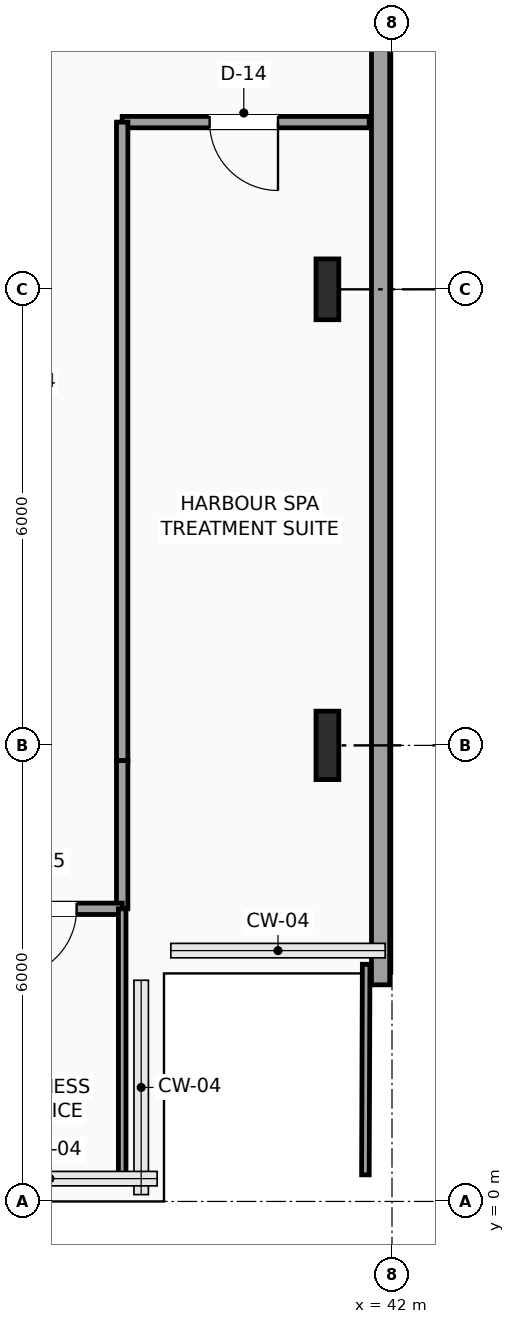
"""IFC4 building model, lengths in metres.
Left out: names, types, materials, properties, quantities, classifications, styles, units other than length and angle.
Written with IfcOpenShell. Run it as: python <this file> out.ifc"""

import sys

from ifc_helpers import new_model, si_unit, direction, frame, frame_2d, origin, origin_2d, place, context, subcontext, project, spatial, rectangle, i_section, extrude, element, fill, save


model = new_model("IFC4")
c1 = context("Model", 3, precision=1e-05, world=origin(), true_north=direction((0.0, 1.0)))
c2 = subcontext(c1, "Body", "Model", "MODEL_VIEW")
j1 = project(units=[si_unit("LENGTHUNIT", "METRE"), si_unit("PLANEANGLEUNIT", "RADIAN")], contexts=[c1])
p1 = place(None, origin())
s1 = spatial("IfcSite", under=j1, at=p1, CompositionType="ELEMENT")
p2 = place(p1, origin())
s2 = spatial("IfcBuilding", under=s1, at=p2, CompositionType="ELEMENT")
p3 = place(p2, frame((0.0, 0.0, 195.45)))
s3 = spatial("IfcBuildingStorey", under=s2, at=p3, CompositionType="ELEMENT", Elevation=195.45)
p4 = place(p3, frame((41.15, 6.0, 0.0), z_axis=(0.0, 0.0, 1.0), x_axis=(1.0, 0.0, 0.0)))
e1 = element("IfcColumn", 1, at=p4, inside=s3, PredefinedType="COLUMN", context=c2, shape_type="SweptSolid", body=[
    extrude(i_section(OverallWidth=0.3, OverallDepth=0.9, WebThickness=0.019, FlangeThickness=0.035, FilletRadius=0.03, at=origin_2d()), origin(), (0.0, 0.0, 1.0), 3.75),
])
p5 = place(p3, frame((41.15, 12.0, 0.0), z_axis=(0.0, 0.0, 1.0), x_axis=(1.0, 0.0, 0.0)))
e2 = element("IfcColumn", 2, at=p5, inside=s3, PredefinedType="COLUMN", context=c2, shape_type="SweptSolid", body=[
    extrude(i_section(OverallWidth=0.3, OverallDepth=0.8, WebThickness=0.018, FlangeThickness=0.033, FilletRadius=0.03, at=origin_2d()), origin(), (0.0, 0.0, 1.0), 3.75),
])
p6 = place(p3, frame((41.85, 21.15, 0.0), z_axis=(0.0, 0.0, 1.0), x_axis=(0.0, -1.0, 0.0)))
e3 = element("IfcWall", 3, at=p6, inside=s3, PredefinedType="SOLIDWALL", context=c2, shape_type="SweptSolid", body=[
    extrude(rectangle(XDim=18.3, YDim=0.24, at=frame_2d((9.15, 0.0))), origin(), (0.0, 0.0, 1.0), 3.475),
])
p7 = place(p3, frame((41.7, 14.2, 0.0), z_axis=(0.0, 0.0, 1.0), x_axis=(-1.0, 0.0, 0.0)))
e4 = element("IfcWall", 4, at=p7, inside=s3, PredefinedType="PARTITIONING", context=c2, shape_type="SweptSolid", body=[
    extrude(rectangle(XDim=3.25, YDim=0.15, at=frame_2d((1.625, 0.0))), origin(), (0.0, 0.0, 1.0), 3.475),
])
p8 = place(p7, frame((1.2, 0.0, 0.0)))
e5 = element("IfcOpeningElement", 5, at=p8, cuts=e4, PredefinedType="OPENING", context=c2, shape_type="SweptSolid", body=[
    extrude(rectangle(XDim=0.9, YDim=2.1, at=frame_2d((0.45, 1.05))), frame((0.0, 0.085, 0.0), z_axis=(0.0, -1.0, 0.0), x_axis=(1.0, 0.0, 0.0)), (0.0, 0.0, 1.0), 0.17),
])
p9 = place(p3, frame((38.45, 14.2, 0.0), z_axis=(0.0, 0.0, 1.0), x_axis=(0.0, -1.0, 0.0)))
e6 = element("IfcWall", 6, at=p9, inside=s3, PredefinedType="PARTITIONING", context=c2, shape_type="SweptSolid", body=[
    extrude(rectangle(XDim=8.4, YDim=0.15, at=frame_2d((4.2, 0.0))), origin(), (0.0, 0.0, 1.0), 3.475),
])
p10 = place(p3, frame((38.45, 5.8, 0.0), z_axis=(0.0, 0.0, 1.0), x_axis=(0.0, -1.0, 0.0)))
e7 = element("IfcWall", 7, at=p10, inside=s3, PredefinedType="PARTITIONING", context=c2, shape_type="SweptSolid", body=[
    extrude(rectangle(XDim=1.95, YDim=0.15, at=frame_2d((0.975, 0.0))), origin(), (0.0, 0.0, 1.0), 3.475),
])
p11 = place(p3, frame((38.45, 3.85, 0.0), z_axis=(0.0, 0.0, 1.0), x_axis=(-1.0, 0.0, 0.0)))
e8 = element("IfcWall", 8, at=p11, inside=s3, PredefinedType="PARTITIONING", context=c2, shape_type="SweptSolid", body=[
    extrude(rectangle(XDim=2.1, YDim=0.15, at=frame_2d((1.05, 0.0))), origin(), (0.0, 0.0, 1.0), 3.475),
])
p12 = place(p11, frame((0.6, 0.0, 0.0)))
e9 = element("IfcOpeningElement", 9, at=p12, cuts=e8, PredefinedType="OPENING", context=c2, shape_type="SweptSolid", body=[
    extrude(rectangle(XDim=0.9, YDim=2.1, at=frame_2d((0.45, 1.05))), frame((0.0, 0.085, 0.0), z_axis=(0.0, -1.0, 0.0), x_axis=(1.0, 0.0, 0.0)), (0.0, 0.0, 1.0), 0.17),
])
p13 = place(p3, frame((38.45, 0.3, 0.0), z_axis=(0.0, 0.0, 1.0), x_axis=(0.0, 1.0, 0.0)))
e10 = element("IfcWall", 10, at=p13, inside=s3, PredefinedType="PARTITIONING", context=c2, shape_type="SweptSolid", body=[
    extrude(rectangle(XDim=3.55, YDim=0.1, at=frame_2d((1.775, 0.0))), origin(), (0.0, 0.0, 1.0), 3.475),
])
p14 = place(p3, frame((41.65, 0.35, 0.0), z_axis=(0.0, 0.0, 1.0), x_axis=(0.003613584727, 0.999993470981, 0.0)))
e11 = element("IfcWall", 11, at=p14, inside=s3, PredefinedType="PARTITIONING", context=c2, shape_type="SweptSolid", body=[
    extrude(rectangle(XDim=2.77, YDim=0.1, at=frame_2d((1.385, 0.0))), origin(), (0.0, 0.0, 1.0), 3.475),
])
p15 = place(p8, origin())
e12 = element("IfcDoor", 12, at=p15, inside=s3, OperationType="SINGLE_SWING_LEFT", PredefinedType="DOOR", context=c2, shape_type="SweptSolid", body=[
    extrude(rectangle(XDim=0.9, YDim=2.1, at=frame_2d((0.45, 1.05))), frame((0.0, 0.025, 0.0), z_axis=(0.0, -1.0, 0.0), x_axis=(1.0, 0.0, 0.0)), (0.0, 0.0, 1.0), 0.05),
])
fill(e5, e12)
p16 = place(p12, origin())
e13 = element("IfcDoor", 13, at=p16, inside=s3, OperationType="SINGLE_SWING_RIGHT", PredefinedType="DOOR", context=c2, shape_type="SweptSolid", body=[
    extrude(rectangle(XDim=0.9, YDim=2.1, at=frame_2d((0.45, 1.05))), frame((0.0, 0.025, 0.0), z_axis=(0.0, -1.0, 0.0), x_axis=(1.0, 0.0, 0.0)), (0.0, 0.0, 1.0), 0.05),
])
fill(e9, e13)
save(model, sys.argv[1])
